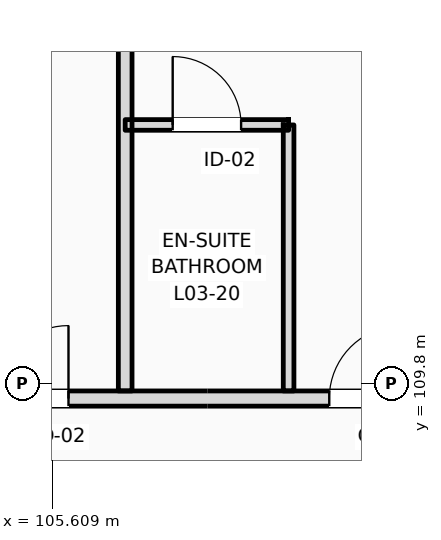
"""IFC4 building model, lengths in metres.
Left out: names, types, materials, properties, quantities, classifications, styles, units other than length and angle.
Written with IfcOpenShell. Run it as: python <this file> out.ifc"""

import sys

from ifc_helpers import new_model, si_unit, direction, frame, frame_2d, origin, place, context, subcontext, project, spatial, rectangle, extrude, element, fill, save


model = new_model("IFC4")
c1 = context("Model", 3, precision=1e-05, world=origin(), true_north=direction((0.0, 1.0)))
c2 = subcontext(c1, "Body", "Model", "MODEL_VIEW")
j1 = project(units=[si_unit("LENGTHUNIT", "METRE"), si_unit("PLANEANGLEUNIT", "RADIAN")], contexts=[c1])
p1 = place(None, origin())
s1 = spatial("IfcSite", under=j1, at=p1, CompositionType="ELEMENT")
p2 = place(p1, origin())
s2 = spatial("IfcBuilding", under=s1, at=p2, CompositionType="ELEMENT")
p3 = place(p2, frame((0.0, 0.0, 16.2)))
s3 = spatial("IfcBuildingStorey", under=s2, at=p3, CompositionType="ELEMENT", Elevation=16.2)
p4 = place(p3, frame((10.65, 109.6, 0.0), z_axis=(0.0, 0.0, 1.0), x_axis=(1.0, 0.0, 0.0)))
e1 = element("IfcWall", 1, at=p4, inside=s3, PredefinedType="PARTITIONING", context=c2, shape_type="SweptSolid", body=[
    extrude(rectangle(XDim=109.21, YDim=0.2, at=frame_2d((54.605, 0.0))), origin(), (0.0, 0.0, 1.0), 3.36),
])
p5 = place(p4, frame((15.43, 0.0, 0.0)))
e2 = element("IfcOpeningElement", 2, at=p5, cuts=e1, PredefinedType="OPENING", context=c2, shape_type="SweptSolid", body=[
    extrude(rectangle(XDim=1.02, YDim=2.2, at=frame_2d((0.51, 1.1))), frame((0.0, 0.11, 0.0), z_axis=(0.0, -1.0, 0.0), x_axis=(1.0, 0.0, 0.0)), (0.0, 0.0, 1.0), 0.22),
])
p6 = place(p4, frame((19.537, 0.0, 0.0)))
e3 = element("IfcOpeningElement", 3, at=p6, cuts=e1, PredefinedType="OPENING", context=c2, shape_type="SweptSolid", body=[
    extrude(rectangle(XDim=1.02, YDim=2.2, at=frame_2d((0.51, 1.1))), frame((0.0, 0.11, 0.0), z_axis=(0.0, -1.0, 0.0), x_axis=(1.0, 0.0, 0.0)), (0.0, 0.0, 1.0), 0.22),
])
p7 = place(p4, frame((23.928, 0.0, 0.0)))
e4 = element("IfcOpeningElement", 4, at=p7, cuts=e1, PredefinedType="OPENING", context=c2, shape_type="SweptSolid", body=[
    extrude(rectangle(XDim=1.02, YDim=2.2, at=frame_2d((0.51, 1.1))), frame((0.0, 0.11, 0.0), z_axis=(0.0, -1.0, 0.0), x_axis=(1.0, 0.0, 0.0)), (0.0, 0.0, 1.0), 0.22),
])
p8 = place(p4, frame((26.169, 0.0, 0.0)))
e5 = element("IfcOpeningElement", 5, at=p8, cuts=e1, PredefinedType="OPENING", context=c2, shape_type="SweptSolid", body=[
    extrude(rectangle(XDim=1.02, YDim=2.2, at=frame_2d((0.51, 1.1))), frame((0.0, 0.11, 0.0), z_axis=(0.0, -1.0, 0.0), x_axis=(1.0, 0.0, 0.0)), (0.0, 0.0, 1.0), 0.22),
])
p9 = place(p4, frame((32.739, 0.0, 0.0)))
e6 = element("IfcOpeningElement", 6, at=p9, cuts=e1, PredefinedType="OPENING", context=c2, shape_type="SweptSolid", body=[
    extrude(rectangle(XDim=0.96, YDim=2.2, at=frame_2d((0.48, 1.1))), frame((0.0, 0.11, 0.0), z_axis=(0.0, -1.0, 0.0), x_axis=(1.0, 0.0, 0.0)), (0.0, 0.0, 1.0), 0.22),
])
p10 = place(p4, frame((34.98, 0.0, 0.0)))
e7 = element("IfcOpeningElement", 7, at=p10, cuts=e1, PredefinedType="OPENING", context=c2, shape_type="SweptSolid", body=[
    extrude(rectangle(XDim=0.96, YDim=2.2, at=frame_2d((0.48, 1.1))), frame((0.0, 0.11, 0.0), z_axis=(0.0, -1.0, 0.0), x_axis=(1.0, 0.0, 0.0)), (0.0, 0.0, 1.0), 0.22),
])
p11 = place(p4, frame((41.521, 0.0, 0.0)))
e8 = element("IfcOpeningElement", 8, at=p11, cuts=e1, PredefinedType="OPENING", context=c2, shape_type="SweptSolid", body=[
    extrude(rectangle(XDim=0.96, YDim=2.2, at=frame_2d((0.48, 1.1))), frame((0.0, 0.11, 0.0), z_axis=(0.0, -1.0, 0.0), x_axis=(1.0, 0.0, 0.0)), (0.0, 0.0, 1.0), 0.22),
])
p12 = place(p4, frame((43.512, 0.0, 0.0)))
e9 = element("IfcOpeningElement", 9, at=p12, cuts=e1, PredefinedType="OPENING", context=c2, shape_type="SweptSolid", body=[
    extrude(rectangle(XDim=0.96, YDim=2.2, at=frame_2d((0.48, 1.1))), frame((0.0, 0.11, 0.0), z_axis=(0.0, -1.0, 0.0), x_axis=(1.0, 0.0, 0.0)), (0.0, 0.0, 1.0), 0.22),
])
p13 = place(p4, frame((50.303, 0.0, 0.0)))
e10 = element("IfcOpeningElement", 10, at=p13, cuts=e1, PredefinedType="OPENING", context=c2, shape_type="SweptSolid", body=[
    extrude(rectangle(XDim=0.96, YDim=2.2, at=frame_2d((0.48, 1.1))), frame((0.0, 0.11, 0.0), z_axis=(0.0, -1.0, 0.0), x_axis=(1.0, 0.0, 0.0)), (0.0, 0.0, 1.0), 0.22),
])
p14 = place(p4, frame((54.944, 0.0, 0.0)))
e11 = element("IfcOpeningElement", 11, at=p14, cuts=e1, PredefinedType="OPENING", context=c2, shape_type="SweptSolid", body=[
    extrude(rectangle(XDim=0.96, YDim=2.2, at=frame_2d((0.48, 1.1))), frame((0.0, 0.11, 0.0), z_axis=(0.0, -1.0, 0.0), x_axis=(1.0, 0.0, 0.0)), (0.0, 0.0, 1.0), 0.22),
])
p15 = place(p4, frame((59.085, 0.0, 0.0)))
e12 = element("IfcOpeningElement", 12, at=p15, cuts=e1, PredefinedType="OPENING", context=c2, shape_type="SweptSolid", body=[
    extrude(rectangle(XDim=0.96, YDim=2.2, at=frame_2d((0.48, 1.1))), frame((0.0, 0.11, 0.0), z_axis=(0.0, -1.0, 0.0), x_axis=(1.0, 0.0, 0.0)), (0.0, 0.0, 1.0), 0.22),
])
p16 = place(p4, frame((63.476, 0.0, 0.0)))
e13 = element("IfcOpeningElement", 13, at=p16, cuts=e1, PredefinedType="OPENING", context=c2, shape_type="SweptSolid", body=[
    extrude(rectangle(XDim=0.96, YDim=2.2, at=frame_2d((0.48, 1.1))), frame((0.0, 0.11, 0.0), z_axis=(0.0, -1.0, 0.0), x_axis=(1.0, 0.0, 0.0)), (0.0, 0.0, 1.0), 0.22),
])
p17 = place(p4, frame((65.716, 0.0, 0.0)))
e14 = element("IfcOpeningElement", 14, at=p17, cuts=e1, PredefinedType="OPENING", context=c2, shape_type="SweptSolid", body=[
    extrude(rectangle(XDim=0.96, YDim=2.2, at=frame_2d((0.48, 1.1))), frame((0.0, 0.11, 0.0), z_axis=(0.0, -1.0, 0.0), x_axis=(1.0, 0.0, 0.0)), (0.0, 0.0, 1.0), 0.22),
])
p18 = place(p4, frame((72.257, 0.0, 0.0)))
e15 = element("IfcOpeningElement", 15, at=p18, cuts=e1, PredefinedType="OPENING", context=c2, shape_type="SweptSolid", body=[
    extrude(rectangle(XDim=0.96, YDim=2.2, at=frame_2d((0.48, 1.1))), frame((0.0, 0.11, 0.0), z_axis=(0.0, -1.0, 0.0), x_axis=(1.0, 0.0, 0.0)), (0.0, 0.0, 1.0), 0.22),
])
p19 = place(p4, frame((74.498, 0.0, 0.0)))
e16 = element("IfcOpeningElement", 16, at=p19, cuts=e1, PredefinedType="OPENING", context=c2, shape_type="SweptSolid", body=[
    extrude(rectangle(XDim=0.96, YDim=2.2, at=frame_2d((0.48, 1.1))), frame((0.0, 0.11, 0.0), z_axis=(0.0, -1.0, 0.0), x_axis=(1.0, 0.0, 0.0)), (0.0, 0.0, 1.0), 0.22),
])
p20 = place(p4, frame((81.039, 0.0, 0.0)))
e17 = element("IfcOpeningElement", 17, at=p20, cuts=e1, PredefinedType="OPENING", context=c2, shape_type="SweptSolid", body=[
    extrude(rectangle(XDim=0.96, YDim=2.2, at=frame_2d((0.48, 1.1))), frame((0.0, 0.11, 0.0), z_axis=(0.0, -1.0, 0.0), x_axis=(1.0, 0.0, 0.0)), (0.0, 0.0, 1.0), 0.22),
])
p21 = place(p4, frame((85.68, 0.0, 0.0)))
e18 = element("IfcOpeningElement", 18, at=p21, cuts=e1, PredefinedType="OPENING", context=c2, shape_type="SweptSolid", body=[
    extrude(rectangle(XDim=0.96, YDim=2.2, at=frame_2d((0.48, 1.1))), frame((0.0, 0.11, 0.0), z_axis=(0.0, -1.0, 0.0), x_axis=(1.0, 0.0, 0.0)), (0.0, 0.0, 1.0), 0.22),
])
p22 = place(p4, frame((89.82, 0.0, 0.0)))
e19 = element("IfcOpeningElement", 19, at=p22, cuts=e1, PredefinedType="OPENING", context=c2, shape_type="SweptSolid", body=[
    extrude(rectangle(XDim=0.96, YDim=2.2, at=frame_2d((0.48, 1.1))), frame((0.0, 0.11, 0.0), z_axis=(0.0, -1.0, 0.0), x_axis=(1.0, 0.0, 0.0)), (0.0, 0.0, 1.0), 0.22),
])
p23 = place(p4, frame((94.211, 0.0, 0.0)))
e20 = element("IfcOpeningElement", 20, at=p23, cuts=e1, PredefinedType="OPENING", context=c2, shape_type="SweptSolid", body=[
    extrude(rectangle(XDim=0.96, YDim=2.2, at=frame_2d((0.48, 1.1))), frame((0.0, 0.11, 0.0), z_axis=(0.0, -1.0, 0.0), x_axis=(1.0, 0.0, 0.0)), (0.0, 0.0, 1.0), 0.22),
])
p24 = place(p4, frame((98.602, 0.0, 0.0)))
e21 = element("IfcOpeningElement", 21, at=p24, cuts=e1, PredefinedType="OPENING", context=c2, shape_type="SweptSolid", body=[
    extrude(rectangle(XDim=0.96, YDim=2.2, at=frame_2d((0.48, 1.1))), frame((0.0, 0.11, 0.0), z_axis=(0.0, -1.0, 0.0), x_axis=(1.0, 0.0, 0.0)), (0.0, 0.0, 1.0), 0.22),
])
p25 = place(p4, frame((102.993, 0.0, 0.0)))
e22 = element("IfcOpeningElement", 22, at=p25, cuts=e1, PredefinedType="OPENING", context=c2, shape_type="SweptSolid", body=[
    extrude(rectangle(XDim=0.96, YDim=2.2, at=frame_2d((0.48, 1.1))), frame((0.0, 0.11, 0.0), z_axis=(0.0, -1.0, 0.0), x_axis=(1.0, 0.0, 0.0)), (0.0, 0.0, 1.0), 0.22),
])
p26 = place(p4, frame((105.269, 0.0, 0.0)))
e23 = element("IfcOpeningElement", 23, at=p26, cuts=e1, PredefinedType="OPENING", context=c2, shape_type="SweptSolid", body=[
    extrude(rectangle(XDim=0.96, YDim=2.2, at=frame_2d((0.48, 1.1))), frame((0.0, 0.11, 0.0), z_axis=(0.0, -1.0, 0.0), x_axis=(1.0, 0.0, 0.0)), (0.0, 0.0, 1.0), 0.22),
])
p27 = place(p4, frame((2.716, 0.0, 0.0)))
e24 = element("IfcOpeningElement", 24, at=p27, cuts=e1, PredefinedType="OPENING", context=c2, shape_type="SweptSolid", body=[
    extrude(rectangle(XDim=1.35, YDim=2.25, at=frame_2d((0.675, 1.125))), frame((0.0, 0.11, 0.0), z_axis=(0.0, -1.0, 0.0), x_axis=(1.0, 0.0, 0.0)), (0.0, 0.0, 1.0), 0.22),
])
p28 = place(p4, frame((6.65, 0.0, 0.0)))
e25 = element("IfcOpeningElement", 25, at=p28, cuts=e1, PredefinedType="OPENING", context=c2, shape_type="SweptSolid", body=[
    extrude(rectangle(XDim=1.35, YDim=2.25, at=frame_2d((0.675, 1.125))), frame((0.0, 0.11, 0.0), z_axis=(0.0, -1.0, 0.0), x_axis=(1.0, 0.0, 0.0)), (0.0, 0.0, 1.0), 0.22),
])
p29 = place(p4, frame((10.583, 0.0, 0.0)))
e26 = element("IfcOpeningElement", 26, at=p29, cuts=e1, PredefinedType="OPENING", context=c2, shape_type="SweptSolid", body=[
    extrude(rectangle(XDim=1.35, YDim=2.25, at=frame_2d((0.675, 1.125))), frame((0.0, 0.11, 0.0), z_axis=(0.0, -1.0, 0.0), x_axis=(1.0, 0.0, 0.0)), (0.0, 0.0, 1.0), 0.22),
])
p30 = place(p3, frame((106.567, 109.7, 0.0), z_axis=(0.0, 0.0, 1.0), x_axis=(0.0, 1.0, 0.0)))
e27 = element("IfcWall", 27, at=p30, inside=s3, PredefinedType="PARTITIONING", context=c2, shape_type="SweptSolid", body=[
    extrude(rectangle(XDim=8.15, YDim=0.18, at=frame_2d((4.075, 0.0))), origin(), (0.0, 0.0, 1.0), 3.92),
])
p31 = place(p3, frame((108.717, 109.7, 0.0), z_axis=(0.0, 0.0, 1.0), x_axis=(0.0, 1.0, 0.0)))
e28 = element("IfcWall", 28, at=p31, inside=s3, PredefinedType="PARTITIONING", context=c2, shape_type="SweptSolid", body=[
    extrude(rectangle(XDim=3.5, YDim=0.14, at=frame_2d((1.75, 0.0))), origin(), (0.0, 0.0, 1.0), 3.61),
])
p32 = place(p3, frame((106.567, 113.2, 0.0), z_axis=(0.0, 0.0, 1.0), x_axis=(1.0, 0.0, 0.0)))
e29 = element("IfcWall", 29, at=p32, inside=s3, PredefinedType="PARTITIONING", context=c2, shape_type="SweptSolid", body=[
    extrude(rectangle(XDim=2.15, YDim=0.14, at=frame_2d((1.075, 0.0))), origin(), (0.0, 0.0, 1.0), 3.92),
])
p33 = place(p32, frame((0.625, 0.0, 0.0)))
e30 = element("IfcOpeningElement", 30, at=p33, cuts=e29, PredefinedType="OPENING", context=c2, shape_type="SweptSolid", body=[
    extrude(rectangle(XDim=0.9, YDim=2.1, at=frame_2d((0.45, 1.05))), frame((0.0, 0.08, 0.0), z_axis=(0.0, -1.0, 0.0), x_axis=(1.0, 0.0, 0.0)), (0.0, 0.0, 1.0), 0.16),
])
p34 = place(p23, origin())
e31 = element("IfcDoor", 31, at=p34, inside=s3, OperationType="SINGLE_SWING_RIGHT", PredefinedType="DOOR", context=c2, shape_type="SweptSolid", body=[
    extrude(rectangle(XDim=0.96, YDim=2.2, at=frame_2d((0.48, 1.1))), frame((0.0, 0.025, 0.0), z_axis=(0.0, -1.0, 0.0), x_axis=(1.0, 0.0, 0.0)), (0.0, 0.0, 1.0), 0.05),
])
fill(e20, e31)
p35 = place(p24, origin())
e32 = element("IfcDoor", 32, at=p35, inside=s3, OperationType="SINGLE_SWING_RIGHT", PredefinedType="DOOR", context=c2, shape_type="SweptSolid", body=[
    extrude(rectangle(XDim=0.96, YDim=2.2, at=frame_2d((0.48, 1.1))), frame((0.0, 0.025, 0.0), z_axis=(0.0, -1.0, 0.0), x_axis=(1.0, 0.0, 0.0)), (0.0, 0.0, 1.0), 0.05),
])
fill(e21, e32)
p36 = place(p33, origin())
e33 = element("IfcDoor", 33, at=p36, inside=s3, OperationType="SINGLE_SWING_LEFT", PredefinedType="DOOR", context=c2, shape_type="SweptSolid", body=[
    extrude(rectangle(XDim=0.9, YDim=2.1, at=frame_2d((0.45, 1.05))), frame((0.0, 0.025, 0.0), z_axis=(0.0, -1.0, 0.0), x_axis=(1.0, 0.0, 0.0)), (0.0, 0.0, 1.0), 0.05),
])
fill(e30, e33)
save(model, sys.argv[1])
